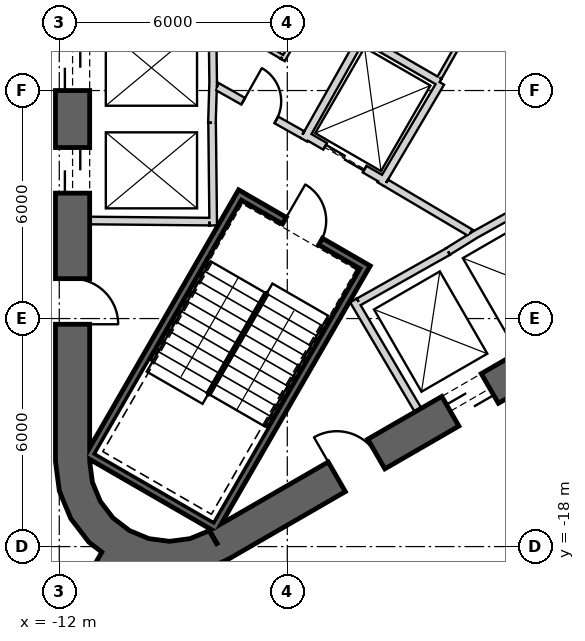
"""IFC4 building model, lengths in metres.
Left out: names, types, materials, properties, quantities, classifications, styles, units other than length and angle.
Written with IfcOpenShell. Run it as: python <this file> out.ifc"""

import sys

from ifc_helpers import new_model, si_unit, direction, frame, frame_2d, origin, place, context, subcontext, project, spatial, polyline, rectangle, outline, extrude, element, fill, save


model = new_model("IFC4")
c1 = context("Model", 3, precision=1e-05, world=origin(), true_north=direction((0.0, 1.0)))
c2 = subcontext(c1, "Body", "Model", "MODEL_VIEW")
j1 = project(units=[si_unit("LENGTHUNIT", "METRE"), si_unit("PLANEANGLEUNIT", "RADIAN")], contexts=[c1])
p1 = place(None, origin())
s1 = spatial("IfcSite", under=j1, at=p1, CompositionType="ELEMENT")
p2 = place(p1, origin())
s2 = spatial("IfcBuilding", under=s1, at=p2, CompositionType="ELEMENT")
p3 = place(p2, frame((0.0, 0.0, 169.2)))
s3 = spatial("IfcBuildingStorey", under=s2, at=p3, CompositionType="ELEMENT", Elevation=169.2)
p4 = place(p3, frame((-11.65, 15.762, 0.0), z_axis=(0.0, 0.0, 1.0), x_axis=(0.0, -1.0, 0.0)))
e1 = element("IfcWall", 1, at=p4, inside=s3, PredefinedType="SHEAR", context=c2, shape_type="SweptSolid", body=[
    extrude(rectangle(XDim=31.523, YDim=0.9, at=frame_2d((15.762, 0.0))), origin(), (0.0, 0.0, 1.0), 4.0),
])
p5 = place(p4, frame((7.062, 0.0, 0.0)))
e2 = element("IfcOpeningElement", 2, at=p5, cuts=e1, PredefinedType="OPENING", context=c2, shape_type="SweptSolid", body=[
    extrude(rectangle(XDim=1.2, YDim=2.4, at=frame_2d((0.6, 1.2))), frame((0.0, 0.46, 0.0), z_axis=(0.0, -1.0, 0.0), x_axis=(1.0, 0.0, 0.0)), (0.0, 0.0, 1.0), 0.92),
])
p6 = place(p4, frame((9.762, 0.0, 0.0)))
e3 = element("IfcOpeningElement", 3, at=p6, cuts=e1, PredefinedType="OPENING", context=c2, shape_type="SweptSolid", body=[
    extrude(rectangle(XDim=1.2, YDim=2.4, at=frame_2d((0.6, 1.2))), frame((0.0, 0.46, 0.0), z_axis=(0.0, -1.0, 0.0), x_axis=(1.0, 0.0, 0.0)), (0.0, 0.0, 1.0), 0.92),
])
p7 = place(p4, frame((12.462, 0.0, 0.0)))
e4 = element("IfcOpeningElement", 4, at=p7, cuts=e1, PredefinedType="OPENING", context=c2, shape_type="SweptSolid", body=[
    extrude(rectangle(XDim=1.2, YDim=2.4, at=frame_2d((0.6, 1.2))), frame((0.0, 0.46, 0.0), z_axis=(0.0, -1.0, 0.0), x_axis=(1.0, 0.0, 0.0)), (0.0, 0.0, 1.0), 0.92),
])
p8 = place(p4, frame((15.162, 0.0, 0.0)))
e5 = element("IfcOpeningElement", 5, at=p8, cuts=e1, PredefinedType="OPENING", context=c2, shape_type="SweptSolid", body=[
    extrude(rectangle(XDim=1.2, YDim=2.4, at=frame_2d((0.6, 1.2))), frame((0.0, 0.46, 0.0), z_axis=(0.0, -1.0, 0.0), x_axis=(1.0, 0.0, 0.0)), (0.0, 0.0, 1.0), 0.92),
])
p9 = place(p4, frame((17.862, 0.0, 0.0)))
e6 = element("IfcOpeningElement", 6, at=p9, cuts=e1, PredefinedType="OPENING", context=c2, shape_type="SweptSolid", body=[
    extrude(rectangle(XDim=1.2, YDim=2.4, at=frame_2d((0.6, 1.2))), frame((0.0, 0.46, 0.0), z_axis=(0.0, -1.0, 0.0), x_axis=(1.0, 0.0, 0.0)), (0.0, 0.0, 1.0), 0.92),
])
p10 = place(p4, frame((20.562, 0.0, 0.0)))
e7 = element("IfcOpeningElement", 7, at=p10, cuts=e1, PredefinedType="OPENING", context=c2, shape_type="SweptSolid", body=[
    extrude(rectangle(XDim=1.2, YDim=2.4, at=frame_2d((0.6, 1.2))), frame((0.0, 0.46, 0.0), z_axis=(0.0, -1.0, 0.0), x_axis=(1.0, 0.0, 0.0)), (0.0, 0.0, 1.0), 0.92),
])
p11 = place(p4, frame((23.262, 0.0, 0.0)))
e8 = element("IfcOpeningElement", 8, at=p11, cuts=e1, PredefinedType="OPENING", context=c2, shape_type="SweptSolid", body=[
    extrude(rectangle(XDim=1.2, YDim=2.4, at=frame_2d((0.6, 1.2))), frame((0.0, 0.46, 0.0), z_axis=(0.0, -1.0, 0.0), x_axis=(1.0, 0.0, 0.0)), (0.0, 0.0, 1.0), 0.92),
])
p12 = place(p4, frame((3.612, 0.0, 0.0)))
e9 = element("IfcOpeningElement", 9, at=p12, cuts=e1, PredefinedType="OPENING", context=c2, shape_type="SweptSolid", body=[
    extrude(rectangle(XDim=1.2, YDim=2.4, at=frame_2d((0.6, 1.2))), frame((0.0, 0.46, 0.0), z_axis=(0.0, -1.0, 0.0), x_axis=(1.0, 0.0, 0.0)), (0.0, 0.0, 1.0), 0.92),
])
p13 = place(p4, frame((26.712, 0.0, 0.0)))
e10 = element("IfcOpeningElement", 10, at=p13, cuts=e1, PredefinedType="OPENING", context=c2, shape_type="SweptSolid", body=[
    extrude(rectangle(XDim=1.2, YDim=2.4, at=frame_2d((0.6, 1.2))), frame((0.0, 0.46, 0.0), z_axis=(0.0, -1.0, 0.0), x_axis=(1.0, 0.0, 0.0)), (0.0, 0.0, 1.0), 0.92),
])
p14 = place(p3, frame((-7.825, -17.97, 0.0), z_axis=(0.0, 0.0, 1.0), x_axis=(0.866028369851, 0.499994862586, 0.0)))
e11 = element("IfcWall", 11, at=p14, inside=s3, PredefinedType="SHEAR", context=c2, shape_type="SweptSolid", body=[
    extrude(rectangle(XDim=31.523, YDim=0.9, at=frame_2d((15.762, 0.0))), origin(), (0.0, 0.0, 1.0), 4.0),
])
p15 = place(p14, frame((7.062, 0.0, 0.0)))
e12 = element("IfcOpeningElement", 12, at=p15, cuts=e11, PredefinedType="OPENING", context=c2, shape_type="SweptSolid", body=[
    extrude(rectangle(XDim=1.2, YDim=2.4, at=frame_2d((0.6, 1.2))), frame((0.0, 0.46, 0.0), z_axis=(0.0, -1.0, 0.0), x_axis=(1.0, 0.0, 0.0)), (0.0, 0.0, 1.0), 0.92),
])
p16 = place(p14, frame((9.762, 0.0, 0.0)))
e13 = element("IfcOpeningElement", 13, at=p16, cuts=e11, PredefinedType="OPENING", context=c2, shape_type="SweptSolid", body=[
    extrude(rectangle(XDim=1.2, YDim=2.4, at=frame_2d((0.6, 1.2))), frame((0.0, 0.46, 0.0), z_axis=(0.0, -1.0, 0.0), x_axis=(1.0, 0.0, 0.0)), (0.0, 0.0, 1.0), 0.92),
])
p17 = place(p14, frame((12.462, 0.0, 0.0)))
e14 = element("IfcOpeningElement", 14, at=p17, cuts=e11, PredefinedType="OPENING", context=c2, shape_type="SweptSolid", body=[
    extrude(rectangle(XDim=1.2, YDim=2.4, at=frame_2d((0.6, 1.2))), frame((0.0, 0.46, 0.0), z_axis=(0.0, -1.0, 0.0), x_axis=(1.0, 0.0, 0.0)), (0.0, 0.0, 1.0), 0.92),
])
p18 = place(p14, frame((15.162, 0.0, 0.0)))
e15 = element("IfcOpeningElement", 15, at=p18, cuts=e11, PredefinedType="OPENING", context=c2, shape_type="SweptSolid", body=[
    extrude(rectangle(XDim=1.2, YDim=2.4, at=frame_2d((0.6, 1.2))), frame((0.0, 0.46, 0.0), z_axis=(0.0, -1.0, 0.0), x_axis=(1.0, 0.0, 0.0)), (0.0, 0.0, 1.0), 0.92),
])
p19 = place(p14, frame((17.862, 0.0, 0.0)))
e16 = element("IfcOpeningElement", 16, at=p19, cuts=e11, PredefinedType="OPENING", context=c2, shape_type="SweptSolid", body=[
    extrude(rectangle(XDim=1.2, YDim=2.4, at=frame_2d((0.6, 1.2))), frame((0.0, 0.46, 0.0), z_axis=(0.0, -1.0, 0.0), x_axis=(1.0, 0.0, 0.0)), (0.0, 0.0, 1.0), 0.92),
])
p20 = place(p14, frame((20.562, 0.0, 0.0)))
e17 = element("IfcOpeningElement", 17, at=p20, cuts=e11, PredefinedType="OPENING", context=c2, shape_type="SweptSolid", body=[
    extrude(rectangle(XDim=1.2, YDim=2.4, at=frame_2d((0.6, 1.2))), frame((0.0, 0.46, 0.0), z_axis=(0.0, -1.0, 0.0), x_axis=(1.0, 0.0, 0.0)), (0.0, 0.0, 1.0), 0.92),
])
p21 = place(p14, frame((26.712, 0.0, 0.0)))
e18 = element("IfcOpeningElement", 18, at=p21, cuts=e11, PredefinedType="OPENING", context=c2, shape_type="SweptSolid", body=[
    extrude(rectangle(XDim=1.2, YDim=2.4, at=frame_2d((0.6, 1.2))), frame((0.0, 0.46, 0.0), z_axis=(0.0, -1.0, 0.0), x_axis=(1.0, 0.0, 0.0)), (0.0, 0.0, 1.0), 0.92),
])
p22 = place(p14, frame((3.612, 0.0, 0.0)))
e19 = element("IfcOpeningElement", 19, at=p22, cuts=e11, PredefinedType="OPENING", context=c2, shape_type="SweptSolid", body=[
    extrude(rectangle(XDim=1.2, YDim=2.4, at=frame_2d((0.6, 1.2))), frame((0.0, 0.46, 0.0), z_axis=(0.0, -1.0, 0.0), x_axis=(1.0, 0.0, 0.0)), (0.0, 0.0, 1.0), 0.92),
])
p23 = place(p3, origin())
e20 = element("IfcWall", 20, at=p23, inside=s3, PredefinedType="SHEAR", context=c2, shape_type="SweptSolid", body=[
    extrude(outline(polyline([(-12.1, -15.762), (-11.998, -16.538), (-11.698, -17.262), (-11.221, -17.883), (-10.6, -18.36), (-9.876, -18.659), (-9.1, -18.762), (-8.323, -18.659), (-7.6, -18.36), (-8.05, -17.58), (-8.556, -17.79), (-9.1, -17.862), (-9.644, -17.79), (-10.15, -17.58), (-10.585, -17.247), (-10.919, -16.812), (-11.128, -16.305), (-11.2, -15.762), (-12.1, -15.762)])), origin(), (0.0, 0.0, 1.0), 4.0),
])
p24 = place(p3, frame((-10.575, -18.316, 0.0), z_axis=(0.0, 0.0, 1.0), x_axis=(-0.499995558535, -0.86602796805, 0.0)))
e21 = element("IfcWall", 21, at=p24, inside=s3, PredefinedType="SHEAR", context=c2, shape_type="SweptSolid", body=[
    extrude(rectangle(XDim=12.433, YDim=0.7, at=frame_2d((6.216, 0.0))), origin(), (0.0, 0.0, 1.0), 4.0),
])
p25 = place(p3, frame((-7.95, -5.772, 0.0), z_axis=(0.0, 0.0, 1.0), x_axis=(-0.030803413295, -0.999525462272, 0.0)))
e22 = element("IfcWall", 22, at=p25, inside=s3, PredefinedType="PLUMBINGWALL", context=c2, shape_type="SweptSolid", body=[
    extrude(rectangle(XDim=1.078, YDim=0.2, at=frame_2d((0.539, 0.0))), origin(), (0.0, 0.0, 1.0), 3.7),
])
p26 = place(p3, frame((-7.971, -4.05, 0.0), z_axis=(0.0, 0.0, 1.0), x_axis=(0.012042535896, -0.999927486035, 0.0)))
e23 = element("IfcWall", 23, at=p26, inside=s3, PredefinedType="PLUMBINGWALL", context=c2, shape_type="SweptSolid", body=[
    extrude(rectangle(XDim=1.845, YDim=0.2, at=frame_2d((0.922, 0.0))), origin(), (0.0, 0.0, 1.0), 3.7),
])
p27 = place(p3, frame((-7.979, -6.85, 0.0), z_axis=(0.0, 0.0, 1.0), x_axis=(0.011121475088, -0.999938154483, 0.0)))
e24 = element("IfcWall", 24, at=p27, inside=s3, PredefinedType="PLUMBINGWALL", context=c2, shape_type="SweptSolid", body=[
    extrude(rectangle(XDim=2.7, YDim=0.2, at=frame_2d((1.35, 0.0))), origin(), (0.0, 0.0, 1.0), 3.7),
])
p28 = place(p3, frame((-8.05, -9.449, 0.0), z_axis=(0.0, 0.0, 1.0), x_axis=(-0.999957467379, 0.009222983926, 0.0)))
e25 = element("IfcWall", 25, at=p28, inside=s3, PredefinedType="PLUMBINGWALL", context=c2, shape_type="SweptSolid", body=[
    extrude(rectangle(XDim=3.15, YDim=0.2, at=frame_2d((1.575, 0.0))), origin(), (0.0, 0.0, 1.0), 3.7),
])
p29 = place(p3, frame((-2.558, -14.409, 0.0), z_axis=(0.0, 0.0, 1.0), x_axis=(-0.507997497166, 0.861358544901, 0.0)))
e26 = element("IfcWall", 26, at=p29, inside=s3, PredefinedType="PLUMBINGWALL", context=c2, shape_type="SweptSolid", body=[
    extrude(rectangle(XDim=3.35, YDim=0.2, at=frame_2d((1.675, 0.0))), origin(), (0.0, 0.0, 1.0), 3.7),
])
p30 = place(p3, frame((-1.769, -10.237, 0.0), z_axis=(0.0, 0.0, 1.0), x_axis=(-0.871534483978, -0.490334215854, 0.0)))
e27 = element("IfcWall", 27, at=p30, inside=s3, PredefinedType="PLUMBINGWALL", context=c2, shape_type="SweptSolid", body=[
    extrude(rectangle(XDim=2.7, YDim=0.2, at=frame_2d((1.35, 0.0))), origin(), (0.0, 0.0, 1.0), 3.7),
])
p31 = place(p3, frame((-1.024, -9.771, 0.0), z_axis=(0.0, 0.0, 1.0), x_axis=(-0.850348075135, -0.526220629693, 0.0)))
e28 = element("IfcWall", 28, at=p31, inside=s3, PredefinedType="PLUMBINGWALL", context=c2, shape_type="SweptSolid", body=[
    extrude(rectangle(XDim=0.878, YDim=0.2, at=frame_2d((0.439, 0.0))), origin(), (0.0, 0.0, 1.0), 3.7),
])
p32 = place(p3, frame((-1.13, -9.831, 0.0), z_axis=(0.0, 0.0, 1.0), x_axis=(0.874269620932, 0.485440655401, 0.0)))
e29 = element("IfcWall", 29, at=p32, inside=s3, PredefinedType="PLUMBINGWALL", context=c2, shape_type="SweptSolid", body=[
    extrude(rectangle(XDim=1.845, YDim=0.2, at=frame_2d((0.922, 0.0))), origin(), (0.0, 0.0, 1.0), 3.7),
])
p33 = place(p3, frame((-3.905, -10.563, -0.3), z_axis=(0.0, 0.0, 1.0), x_axis=(-0.500012932018, -0.866017937352, 0.0)))
e30 = element("IfcWall", 30, at=p33, inside=s3, PredefinedType="SHEAR", context=c2, shape_type="SweptSolid", body=[
    extrude(rectangle(XDim=8.1, YDim=0.2, at=frame_2d((4.05, 0.0))), origin(), (0.0, 0.0, 1.0), 4.0),
])
p34 = place(p3, frame((-11.282, -15.541, -0.3), z_axis=(0.0, 0.0, 1.0), x_axis=(0.866000483506, -0.500043160704, 0.0)))
e31 = element("IfcWall", 31, at=p34, inside=s3, PredefinedType="SHEAR", context=c2, shape_type="SweptSolid", body=[
    extrude(rectangle(XDim=3.8, YDim=0.2, at=frame_2d((1.9, 0.0))), origin(), (0.0, 0.0, 1.0), 4.0),
])
p35 = place(p3, frame((-7.196, -8.663, -0.3), z_axis=(0.0, 0.0, 1.0), x_axis=(-0.499997992926, -0.866026562566, 0.0)))
e32 = element("IfcWall", 32, at=p35, inside=s3, PredefinedType="SHEAR", context=c2, shape_type="SweptSolid", body=[
    extrude(rectangle(XDim=7.9, YDim=0.2, at=frame_2d((3.95, 0.0))), origin(), (0.0, 0.0, 1.0), 4.0),
])
p36 = place(p3, frame((-4.041, -10.599, -0.3), z_axis=(0.0, 0.0, 1.0), x_axis=(-0.866047807691, 0.499961193289, 0.0)))
e33 = element("IfcWall", 33, at=p36, inside=s3, PredefinedType="SHEAR", context=c2, shape_type="SweptSolid", body=[
    extrude(rectangle(XDim=3.6, YDim=0.2, at=frame_2d((1.8, 0.0))), origin(), (0.0, 0.0, 1.0), 4.0),
])
p37 = place(p36, frame((1.25, 0.0, 0.3)))
e34 = element("IfcOpeningElement", 34, at=p37, cuts=e33, PredefinedType="OPENING", context=c2, shape_type="SweptSolid", body=[
    extrude(rectangle(XDim=1.1, YDim=2.1, at=frame_2d((0.55, 1.05))), frame((0.0, 0.11, 0.0), z_axis=(0.0, -1.0, 0.0), x_axis=(1.0, 0.0, 0.0)), (0.0, 0.0, 1.0), 0.22),
])
p38 = place(p3, frame((-3.446, -8.368, 0.0), z_axis=(0.0, 0.0, 1.0), x_axis=(-0.866024647952, 0.500001309137, 0.0)))
e35 = element("IfcWall", 35, at=p38, inside=s3, PredefinedType="PLUMBINGWALL", context=c2, shape_type="SweptSolid", body=[
    extrude(rectangle(XDim=2.4, YDim=0.2, at=frame_2d((1.2, 0.0))), origin(), (0.0, 0.0, 1.0), 3.7),
])
p39 = place(p38, frame((0.6, 0.0, 0.0)))
e36 = element("IfcOpeningElement", 36, at=p39, cuts=e35, PredefinedType="OPENING", context=c2, shape_type="SweptSolid", body=[
    extrude(rectangle(XDim=1.2, YDim=2.4, at=frame_2d((0.6, 1.2))), frame((0.0, 0.11, 0.0), z_axis=(0.0, -1.0, 0.0), x_axis=(1.0, 0.0, 0.0)), (0.0, 0.0, 1.0), 0.22),
])
p40 = place(p3, frame((-1.961, -5.796, 0.0), z_axis=(0.0, 0.0, 1.0), x_axis=(-0.508647062354, -0.860975125052, 0.0)))
e37 = element("IfcWall", 37, at=p40, inside=s3, PredefinedType="PLUMBINGWALL", context=c2, shape_type="SweptSolid", body=[
    extrude(rectangle(XDim=3.1, YDim=0.2, at=frame_2d((1.55, 0.0))), origin(), (0.0, 0.0, 1.0), 3.7),
])
p41 = place(p3, frame((-3.99, -4.509, 0.0), z_axis=(0.0, 0.0, 1.0), x_axis=(-0.491358283181, -0.870957540612, 0.0)))
e38 = element("IfcWall", 38, at=p41, inside=s3, PredefinedType="PLUMBINGWALL", context=c2, shape_type="SweptSolid", body=[
    extrude(rectangle(XDim=3.2, YDim=0.2, at=frame_2d((1.6, 0.0))), origin(), (0.0, 0.0, 1.0), 3.7),
])
p42 = place(p3, frame((-3.953, -4.646, 0.0), z_axis=(0.0, 0.0, 1.0), x_axis=(0.866065302921, -0.4999308863, 0.0)))
e39 = element("IfcWall", 39, at=p42, inside=s3, PredefinedType="PLUMBINGWALL", context=c2, shape_type="SweptSolid", body=[
    extrude(rectangle(XDim=2.264, YDim=0.2, at=frame_2d((1.132, 0.0))), origin(), (0.0, 0.0, 1.0), 3.7),
])
p43 = place(p3, frame((-3.401, -8.43, 0.0), z_axis=(0.0, 0.0, 1.0), x_axis=(0.860615607571, -0.509255118781, 0.0)))
e40 = element("IfcWall", 40, at=p43, inside=s3, PredefinedType="PARTITIONING", context=c2, shape_type="SweptSolid", body=[
    extrude(rectangle(XDim=2.581, YDim=0.2, at=frame_2d((1.29, 0.0))), origin(), (0.0, 0.0, 1.0), 3.7),
])
p44 = place(p3, frame((-7.849, -5.894, 0.0), z_axis=(0.0, 0.0, 1.0), x_axis=(0.871363259478, -0.490638431059, 0.0)))
e41 = element("IfcWall", 41, at=p44, inside=s3, PredefinedType="PARTITIONING", context=c2, shape_type="SweptSolid", body=[
    extrude(rectangle(XDim=2.581, YDim=0.2, at=frame_2d((1.291, 0.0))), origin(), (0.0, 0.0, 1.0), 3.7),
])
p45 = place(p44, frame((0.791, 0.0, 0.0)))
e42 = element("IfcOpeningElement", 42, at=p45, cuts=e41, PredefinedType="OPENING", context=c2, shape_type="SweptSolid", body=[
    extrude(rectangle(XDim=1.0, YDim=2.1, at=frame_2d((0.5, 1.05))), frame((0.0, 0.11, 0.0), z_axis=(0.0, -1.0, 0.0), x_axis=(1.0, 0.0, 0.0)), (0.0, 0.0, 1.0), 0.22),
])
p46 = place(p3, frame((0.224, -1.761, 0.0), z_axis=(0.0, 0.0, 1.0), x_axis=(-0.494327216836, -0.869275907118, 0.0)))
e43 = element("IfcWall", 43, at=p46, inside=s3, PredefinedType="PARTITIONING", context=c2, shape_type="SweptSolid", body=[
    extrude(rectangle(XDim=4.487, YDim=0.12, at=frame_2d((2.244, 0.0))), origin(), (0.0, 0.0, 1.0), 3.7),
])
p47 = place(p46, frame((1.895, 0.0, 0.0)))
e44 = element("IfcOpeningElement", 44, at=p47, cuts=e43, PredefinedType="OPENING", context=c2, shape_type="SweptSolid", body=[
    extrude(rectangle(XDim=0.8, YDim=2.1, at=frame_2d((0.4, 1.05))), frame((0.0, 0.07, 0.0), z_axis=(0.0, -1.0, 0.0), x_axis=(1.0, 0.0, 0.0)), (0.0, 0.0, 1.0), 0.14),
])
p48 = place(p3, frame((-6.118, -5.197, 0.0), z_axis=(0.0, 0.0, 1.0), x_axis=(0.499990139034, 0.866031096941, 0.0)))
e45 = element("IfcWall", 45, at=p48, inside=s3, PredefinedType="PARTITIONING", context=c2, shape_type="SweptSolid", body=[
    extrude(rectangle(XDim=3.0, YDim=0.12, at=frame_2d((1.5, 0.0))), origin(), (0.0, 0.0, 1.0), 3.7),
])
p49 = place(p3, frame((-7.95, -4.041, 0.0), z_axis=(0.0, 0.0, 1.0), x_axis=(0.860112457103, -0.510104461004, 0.0)))
e46 = element("IfcWall", 46, at=p49, inside=s3, PredefinedType="PARTITIONING", context=c2, shape_type="SweptSolid", body=[
    extrude(rectangle(XDim=2.104, YDim=0.12, at=frame_2d((1.052, 0.0))), origin(), (0.0, 0.0, 1.0), 3.7),
])
p50 = place(p3, frame((-6.366, -22.266, 0.0), z_axis=(0.0, 0.0, 1.0), x_axis=(0.866024234898, 0.500002024564, 0.0)))
e47 = element("IfcWall", 47, at=p50, inside=s3, PredefinedType="PARTITIONING", context=c2, shape_type="SweptSolid", body=[
    extrude(rectangle(XDim=12.296, YDim=0.2, at=frame_2d((6.148, 0.0))), origin(), (0.0, 0.0, 1.0), 2.88),
])
p51 = place(p37, origin())
e48 = element("IfcDoor", 48, at=p51, inside=s3, OperationType="SINGLE_SWING_RIGHT", PredefinedType="USERDEFINED", context=c2, shape_type="SweptSolid", body=[
    extrude(rectangle(XDim=1.1, YDim=2.1, at=frame_2d((0.55, 1.05))), frame((0.0, 0.025, 0.0), z_axis=(0.0, -1.0, 0.0), x_axis=(1.0, 0.0, 0.0)), (0.0, 0.0, 1.0), 0.05),
])
fill(e34, e48)
p52 = place(p45, origin())
e49 = element("IfcDoor", 49, at=p52, inside=s3, OperationType="SINGLE_SWING_LEFT", PredefinedType="USERDEFINED", context=c2, shape_type="SweptSolid", body=[
    extrude(rectangle(XDim=1.0, YDim=2.1, at=frame_2d((0.5, 1.05))), frame((0.0, 0.025, 0.0), z_axis=(0.0, -1.0, 0.0), x_axis=(1.0, 0.0, 0.0)), (0.0, 0.0, 1.0), 0.05),
])
fill(e42, e49)
p53 = place(p39, origin())
e50 = element("IfcDoor", 50, at=p53, inside=s3, OperationType="SLIDING_TO_LEFT", PredefinedType="USERDEFINED", context=c2, shape_type="SweptSolid", body=[
    extrude(rectangle(XDim=1.2, YDim=2.4, at=frame_2d((0.6, 1.2))), frame((0.0, 0.025, 0.0), z_axis=(0.0, -1.0, 0.0), x_axis=(1.0, 0.0, 0.0)), (0.0, 0.0, 1.0), 0.05),
])
fill(e36, e50)
p54 = place(p10, origin())
e51 = element("IfcDoor", 51, at=p54, inside=s3, OperationType="SLIDING_TO_LEFT", PredefinedType="USERDEFINED", context=c2, shape_type="SweptSolid", body=[
    extrude(rectangle(XDim=1.2, YDim=2.4, at=frame_2d((0.6, 1.2))), frame((0.0, 0.025, 0.0), z_axis=(0.0, -1.0, 0.0), x_axis=(1.0, 0.0, 0.0)), (0.0, 0.0, 1.0), 0.05),
])
fill(e7, e51)
p55 = place(p11, origin())
e52 = element("IfcDoor", 52, at=p55, inside=s3, OperationType="SLIDING_TO_LEFT", PredefinedType="USERDEFINED", context=c2, shape_type="SweptSolid", body=[
    extrude(rectangle(XDim=1.2, YDim=2.4, at=frame_2d((0.6, 1.2))), frame((0.0, 0.025, 0.0), z_axis=(0.0, -1.0, 0.0), x_axis=(1.0, 0.0, 0.0)), (0.0, 0.0, 1.0), 0.05),
])
fill(e8, e52)
p56 = place(p15, origin())
e53 = element("IfcDoor", 53, at=p56, inside=s3, OperationType="SLIDING_TO_LEFT", PredefinedType="USERDEFINED", context=c2, shape_type="SweptSolid", body=[
    extrude(rectangle(XDim=1.2, YDim=2.4, at=frame_2d((0.6, 1.2))), frame((0.0, 0.025, 0.0), z_axis=(0.0, -1.0, 0.0), x_axis=(1.0, 0.0, 0.0)), (0.0, 0.0, 1.0), 0.05),
])
fill(e12, e53)
p57 = place(p13, origin())
e54 = element("IfcDoor", 54, at=p57, inside=s3, OperationType="SINGLE_SWING_RIGHT", PredefinedType="USERDEFINED", context=c2, shape_type="SweptSolid", body=[
    extrude(rectangle(XDim=1.2, YDim=2.4, at=frame_2d((0.6, 1.2))), frame((0.0, 0.025, 0.0), z_axis=(0.0, -1.0, 0.0), x_axis=(1.0, 0.0, 0.0)), (0.0, 0.0, 1.0), 0.05),
])
fill(e10, e54)
p58 = place(p22, origin())
e55 = element("IfcDoor", 55, at=p58, inside=s3, OperationType="SINGLE_SWING_RIGHT", PredefinedType="USERDEFINED", context=c2, shape_type="SweptSolid", body=[
    extrude(rectangle(XDim=1.2, YDim=2.4, at=frame_2d((0.6, 1.2))), frame((0.0, 0.025, 0.0), z_axis=(0.0, -1.0, 0.0), x_axis=(1.0, 0.0, 0.0)), (0.0, 0.0, 1.0), 0.05),
])
fill(e19, e55)
save(model, sys.argv[1])
